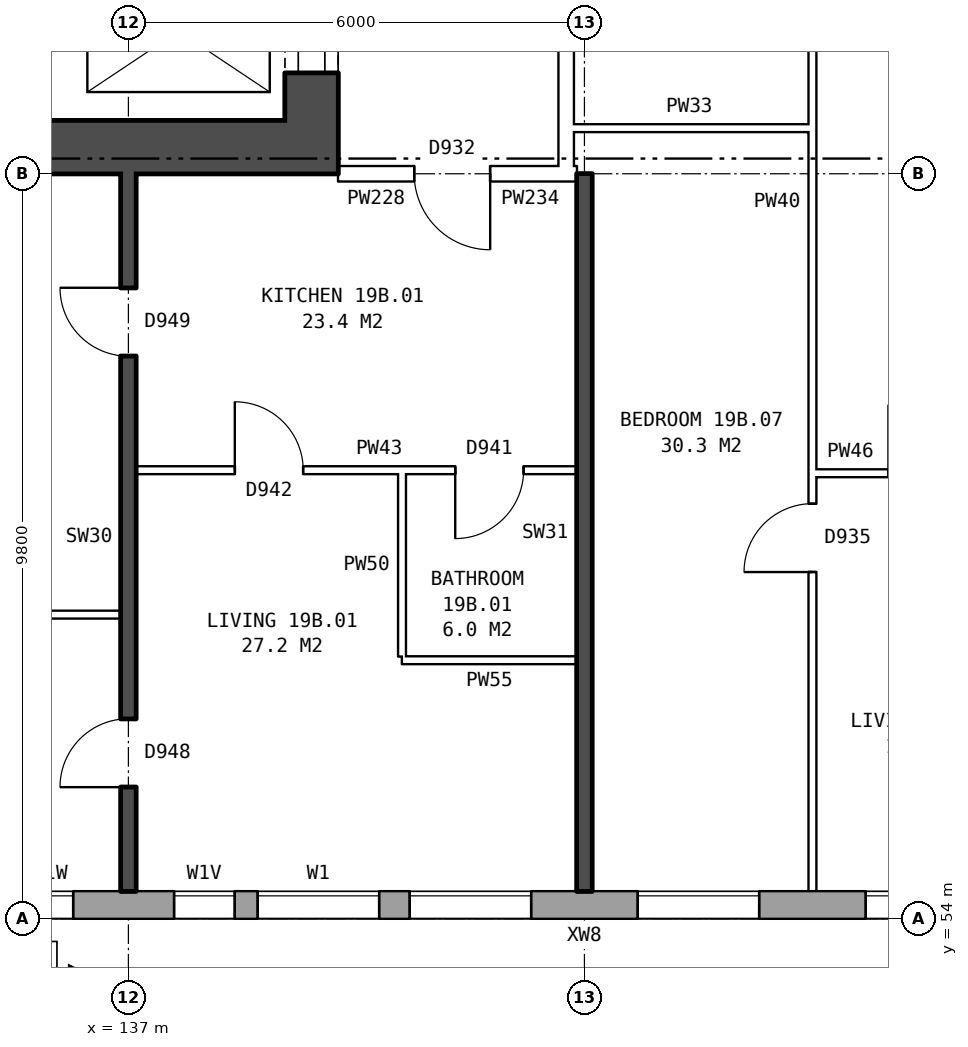
"""IFC4 building model, lengths in metres.
Left out: names, types, materials, properties, quantities, classifications, styles, units other than length and angle.
Written with IfcOpenShell. Run it as: python <this file> out.ifc"""

import sys

from ifc_helpers import new_model, si_unit, direction, frame, frame_2d, origin, place, context, subcontext, project, spatial, rectangle, extrude, element, fill, save


model = new_model("IFC4")
c1 = context("Model", 3, precision=1e-05, world=origin(), true_north=direction((0.0, 1.0)))
c2 = subcontext(c1, "Body", "Model", "MODEL_VIEW")
j1 = project(units=[si_unit("LENGTHUNIT", "METRE"), si_unit("PLANEANGLEUNIT", "RADIAN")], contexts=[c1])
p1 = place(None, origin())
s1 = spatial("IfcSite", under=j1, at=p1, CompositionType="ELEMENT")
p2 = place(p1, origin())
s2 = spatial("IfcBuilding", under=s1, at=p2, CompositionType="ELEMENT")
p3 = place(p2, frame((0.0, 0.0, 71.6)))
s3 = spatial("IfcBuildingStorey", under=s2, at=p3, CompositionType="ELEMENT", Elevation=71.6)
p4 = place(p3, frame((134.075, 54.18, 0.0), z_axis=(0.0, 0.0, 1.0), x_axis=(1.0, 0.0, 0.0)))
e1 = element("IfcWall", 1, at=p4, inside=s3, PredefinedType="STANDARD", context=c2, shape_type="SweptSolid", body=[
    extrude(rectangle(XDim=38.101, YDim=0.36, at=frame_2d((19.05, 0.0))), origin(), (0.0, 0.0, 1.0), 2.85),
])
p5 = place(p4, frame((0.3, 0.0, 0.8)))
e2 = element("IfcOpeningElement", 2, at=p5, cuts=e1, PredefinedType="OPENING", context=c2, shape_type="SweptSolid", body=[
    extrude(rectangle(XDim=1.0, YDim=1.8, at=frame_2d((0.5, 0.9))), frame((0.0, 0.19, 0.0), z_axis=(0.0, -1.0, 0.0), x_axis=(1.0, 0.0, 0.0)), (0.0, 0.0, 1.0), 0.38),
])
p6 = place(p4, frame((3.525, 0.0, 0.8)))
e3 = element("IfcOpeningElement", 3, at=p6, cuts=e1, PredefinedType="OPENING", context=c2, shape_type="SweptSolid", body=[
    extrude(rectangle(XDim=0.8, YDim=0.9, at=frame_2d((0.4, 0.45))), frame((0.0, 0.19, 0.0), z_axis=(0.0, -1.0, 0.0), x_axis=(1.0, 0.0, 0.0)), (0.0, 0.0, 1.0), 0.38),
])
p7 = place(p4, frame((6.625, 0.0, 0.8)))
e4 = element("IfcOpeningElement", 4, at=p7, cuts=e1, PredefinedType="OPENING", context=c2, shape_type="SweptSolid", body=[
    extrude(rectangle(XDim=1.6, YDim=1.8, at=frame_2d((0.8, 0.9))), frame((0.0, 0.19, 0.0), z_axis=(0.0, -1.0, 0.0), x_axis=(1.0, 0.0, 0.0)), (0.0, 0.0, 1.0), 0.38),
])
p8 = place(p4, frame((9.625, 0.0, 0.8)))
e5 = element("IfcOpeningElement", 5, at=p8, cuts=e1, PredefinedType="OPENING", context=c2, shape_type="SweptSolid", body=[
    extrude(rectangle(XDim=1.6, YDim=1.8, at=frame_2d((0.8, 0.9))), frame((0.0, 0.19, 0.0), z_axis=(0.0, -1.0, 0.0), x_axis=(1.0, 0.0, 0.0)), (0.0, 0.0, 1.0), 0.38),
])
p9 = place(p4, frame((12.625, 0.0, 0.8)))
e6 = element("IfcOpeningElement", 6, at=p9, cuts=e1, PredefinedType="OPENING", context=c2, shape_type="SweptSolid", body=[
    extrude(rectangle(XDim=1.6, YDim=1.8, at=frame_2d((0.8, 0.9))), frame((0.0, 0.19, 0.0), z_axis=(0.0, -1.0, 0.0), x_axis=(1.0, 0.0, 0.0)), (0.0, 0.0, 1.0), 0.38),
])
p10 = place(p4, frame((15.625, 0.0, 0.8)))
e7 = element("IfcOpeningElement", 7, at=p10, cuts=e1, PredefinedType="OPENING", context=c2, shape_type="SweptSolid", body=[
    extrude(rectangle(XDim=1.6, YDim=1.8, at=frame_2d((0.8, 0.9))), frame((0.0, 0.19, 0.0), z_axis=(0.0, -1.0, 0.0), x_axis=(1.0, 0.0, 0.0)), (0.0, 0.0, 1.0), 0.38),
])
p11 = place(p4, frame((18.625, 0.0, 0.8)))
e8 = element("IfcOpeningElement", 8, at=p11, cuts=e1, PredefinedType="OPENING", context=c2, shape_type="SweptSolid", body=[
    extrude(rectangle(XDim=1.6, YDim=1.8, at=frame_2d((0.8, 0.9))), frame((0.0, 0.19, 0.0), z_axis=(0.0, -1.0, 0.0), x_axis=(1.0, 0.0, 0.0)), (0.0, 0.0, 1.0), 0.38),
])
p12 = place(p4, frame((21.625, 0.0, 0.8)))
e9 = element("IfcOpeningElement", 9, at=p12, cuts=e1, PredefinedType="OPENING", context=c2, shape_type="SweptSolid", body=[
    extrude(rectangle(XDim=1.6, YDim=1.8, at=frame_2d((0.8, 0.9))), frame((0.0, 0.19, 0.0), z_axis=(0.0, -1.0, 0.0), x_axis=(1.0, 0.0, 0.0)), (0.0, 0.0, 1.0), 0.38),
])
p13 = place(p4, frame((24.625, 0.0, 0.8)))
e10 = element("IfcOpeningElement", 10, at=p13, cuts=e1, PredefinedType="OPENING", context=c2, shape_type="SweptSolid", body=[
    extrude(rectangle(XDim=1.6, YDim=1.8, at=frame_2d((0.8, 0.9))), frame((0.0, 0.19, 0.0), z_axis=(0.0, -1.0, 0.0), x_axis=(1.0, 0.0, 0.0)), (0.0, 0.0, 1.0), 0.38),
])
p14 = place(p4, frame((27.625, 0.0, 0.8)))
e11 = element("IfcOpeningElement", 11, at=p14, cuts=e1, PredefinedType="OPENING", context=c2, shape_type="SweptSolid", body=[
    extrude(rectangle(XDim=1.6, YDim=1.8, at=frame_2d((0.8, 0.9))), frame((0.0, 0.19, 0.0), z_axis=(0.0, -1.0, 0.0), x_axis=(1.0, 0.0, 0.0)), (0.0, 0.0, 1.0), 0.38),
])
p15 = place(p4, frame((30.625, 0.0, 0.8)))
e12 = element("IfcOpeningElement", 12, at=p15, cuts=e1, PredefinedType="OPENING", context=c2, shape_type="SweptSolid", body=[
    extrude(rectangle(XDim=1.6, YDim=1.8, at=frame_2d((0.8, 0.9))), frame((0.0, 0.19, 0.0), z_axis=(0.0, -1.0, 0.0), x_axis=(1.0, 0.0, 0.0)), (0.0, 0.0, 1.0), 0.38),
])
p16 = place(p4, frame((33.125, 0.0, 0.8)))
e13 = element("IfcOpeningElement", 13, at=p16, cuts=e1, PredefinedType="OPENING", context=c2, shape_type="SweptSolid", body=[
    extrude(rectangle(XDim=1.4, YDim=0.9, at=frame_2d((0.7, 0.45))), frame((0.0, 0.19, 0.0), z_axis=(0.0, -1.0, 0.0), x_axis=(1.0, 0.0, 0.0)), (0.0, 0.0, 1.0), 0.38),
])
p17 = place(p4, frame((1.6, 0.0, 1.6)))
e14 = element("IfcOpeningElement", 14, at=p17, cuts=e1, PredefinedType="OPENING", context=c2, shape_type="SweptSolid", body=[
    extrude(rectangle(XDim=0.6, YDim=0.9, at=frame_2d((0.3, 0.45))), frame((0.0, 0.19, 0.0), z_axis=(0.0, -1.0, 0.0), x_axis=(1.0, 0.0, 0.0)), (0.0, 0.0, 1.0), 0.38),
])
p18 = place(p4, frame((4.625, 0.0, 0.8)))
e15 = element("IfcOpeningElement", 15, at=p18, cuts=e1, PredefinedType="OPENING", context=c2, shape_type="SweptSolid", body=[
    extrude(rectangle(XDim=1.6, YDim=1.8, at=frame_2d((0.8, 0.9))), frame((0.0, 0.19, 0.0), z_axis=(0.0, -1.0, 0.0), x_axis=(1.0, 0.0, 0.0)), (0.0, 0.0, 1.0), 0.38),
])
p19 = place(p4, frame((35.775, 0.0, 1.7)))
e16 = element("IfcOpeningElement", 16, at=p19, cuts=e1, PredefinedType="OPENING", context=c2, shape_type="SweptSolid", body=[
    extrude(rectangle(XDim=0.6, YDim=0.9, at=frame_2d((0.3, 0.45))), frame((0.0, 0.19, 0.0), z_axis=(0.0, -1.0, 0.0), x_axis=(1.0, 0.0, 0.0)), (0.0, 0.0, 1.0), 0.38),
])
p20 = place(p4, frame((36.675, 0.0, 0.8)))
e17 = element("IfcOpeningElement", 17, at=p20, cuts=e1, PredefinedType="OPENING", context=c2, shape_type="SweptSolid", body=[
    extrude(rectangle(XDim=1.0, YDim=1.8, at=frame_2d((0.5, 0.9))), frame((0.0, 0.19, 0.0), z_axis=(0.0, -1.0, 0.0), x_axis=(1.0, 0.0, 0.0)), (0.0, 0.0, 1.0), 0.38),
])
p21 = place(p3, frame((139.41, 64.5, 0.0), z_axis=(0.0, 0.0, 1.0), x_axis=(0.0, 1.0, 0.0)))
e18 = element("IfcWall", 18, at=p21, inside=s3, PredefinedType="SHEAR", context=c2, shape_type="SweptSolid", body=[
    extrude(rectangle(XDim=11.0, YDim=0.7, at=frame_2d((5.5, 0.0))), origin(), (0.0, 0.0, 1.0), 2.85),
])
p22 = place(p21, frame((0.625, 0.0, 0.0)))
e19 = element("IfcOpeningElement", 19, at=p22, cuts=e18, PredefinedType="OPENING", context=c2, shape_type="SweptSolid", body=[
    extrude(rectangle(XDim=1.1, YDim=2.1, at=frame_2d((0.55, 1.05))), frame((0.0, 0.36, 0.0), z_axis=(0.0, -1.0, 0.0), x_axis=(1.0, 0.0, 0.0)), (0.0, 0.0, 1.0), 0.72),
])
p23 = place(p21, frame((9.2, 0.0, 0.0)))
e20 = element("IfcOpeningElement", 20, at=p23, cuts=e18, PredefinedType="OPENING", context=c2, shape_type="SweptSolid", body=[
    extrude(rectangle(XDim=1.1, YDim=2.1, at=frame_2d((0.55, 1.05))), frame((0.0, 0.36, 0.0), z_axis=(0.0, -1.0, 0.0), x_axis=(1.0, 0.0, 0.0)), (0.0, 0.0, 1.0), 0.72),
])
p24 = place(p21, frame((7.425, 0.0, 0.0)))
e21 = element("IfcOpeningElement", 21, at=p24, cuts=e18, PredefinedType="OPENING", context=c2, shape_type="SweptSolid", body=[
    extrude(rectangle(XDim=0.85, YDim=2.1, at=frame_2d((0.425, 1.05))), frame((0.0, 0.36, 0.0), z_axis=(0.0, -1.0, 0.0), x_axis=(1.0, 0.0, 0.0)), (0.0, 0.0, 1.0), 0.72),
])
p25 = place(p3, frame((139.76, 64.15, 0.0), z_axis=(0.0, 0.0, 1.0), x_axis=(-1.0, 0.0, 0.0)))
e22 = element("IfcWall", 22, at=p25, inside=s3, PredefinedType="SHEAR", context=c2, shape_type="SweptSolid", body=[
    extrude(rectangle(XDim=8.4, YDim=0.7, at=frame_2d((4.2, 0.0))), origin(), (0.0, 0.0, 1.0), 2.85),
])
p26 = place(p3, frame((142.76, 63.9, 0.0), z_axis=(0.0, 0.0, 1.0), x_axis=(0.0, 1.0, 0.0)))
e23 = element("IfcWall", 23, at=p26, inside=s3, PredefinedType="PARTITIONING", context=c2, shape_type="SweptSolid", body=[
    extrude(rectangle(XDim=12.2, YDim=0.2, at=frame_2d((6.1, 0.0))), origin(), (0.0, 0.0, 1.0), 2.85),
])
p27 = place(p26, frame((5.1, 0.0, 0.0)))
e24 = element("IfcOpeningElement", 24, at=p27, cuts=e23, PredefinedType="OPENING", context=c2, shape_type="SweptSolid", body=[
    extrude(rectangle(XDim=2.0, YDim=2.1, at=frame_2d((1.0, 1.05))), frame((0.0, 0.11, 0.0), z_axis=(0.0, -1.0, 0.0), x_axis=(1.0, 0.0, 0.0)), (0.0, 0.0, 1.0), 0.22),
])
p28 = place(p3, frame((140.6, 57.4, 0.0), z_axis=(0.0, 0.0, 1.0), x_axis=(1.0, 0.0, 0.0)))
e25 = element("IfcWall", 25, at=p28, inside=s3, PredefinedType="PARTITIONING", context=c2, shape_type="SweptSolid", body=[
    extrude(rectangle(XDim=2.3, YDim=0.1, at=frame_2d((1.15, 0.0))), origin(), (0.0, 0.0, 1.0), 2.85),
])
p29 = place(p3, frame((131.36, 58.0, 0.0), z_axis=(0.0, 0.0, 1.0), x_axis=(1.0, 0.0, 0.0)))
e26 = element("IfcWall", 26, at=p29, inside=s3, PredefinedType="PARTITIONING", context=c2, shape_type="SweptSolid", body=[
    extrude(rectangle(XDim=5.54, YDim=0.1, at=frame_2d((2.77, 0.0))), origin(), (0.0, 0.0, 1.0), 2.85),
])
p30 = place(p3, frame((146.0, 59.86, 0.0), z_axis=(0.0, 0.0, 1.0), x_axis=(1.0, 0.0, 0.0)))
e27 = element("IfcWall", 27, at=p30, inside=s3, PredefinedType="PARTITIONING", context=c2, shape_type="SweptSolid", body=[
    extrude(rectangle(XDim=2.9, YDim=0.1, at=frame_2d((1.45, 0.0))), origin(), (0.0, 0.0, 1.0), 2.85),
])
p31 = place(p30, frame((1.0, 0.0, 0.0)))
e28 = element("IfcOpeningElement", 28, at=p31, cuts=e27, PredefinedType="OPENING", context=c2, shape_type="SweptSolid", body=[
    extrude(rectangle(XDim=0.9, YDim=2.1, at=frame_2d((0.45, 1.05))), frame((0.0, 0.06, 0.0), z_axis=(0.0, -1.0, 0.0), x_axis=(1.0, 0.0, 0.0)), (0.0, 0.0, 1.0), 0.12),
])
p32 = place(p3, frame((137.1, 59.9, 0.0), z_axis=(0.0, 0.0, 1.0), x_axis=(1.0, 0.0, 0.0)))
e29 = element("IfcWall", 29, at=p32, inside=s3, PredefinedType="PARTITIONING", context=c2, shape_type="SweptSolid", body=[
    extrude(rectangle(XDim=5.8, YDim=0.1, at=frame_2d((2.9, 0.0))), origin(), (0.0, 0.0, 1.0), 2.85),
])
p33 = place(p32, frame((1.3, 0.0, 0.0)))
e30 = element("IfcOpeningElement", 30, at=p33, cuts=e29, PredefinedType="OPENING", context=c2, shape_type="SweptSolid", body=[
    extrude(rectangle(XDim=0.9, YDim=2.1, at=frame_2d((0.45, 1.05))), frame((0.0, 0.06, 0.0), z_axis=(0.0, -1.0, 0.0), x_axis=(1.0, 0.0, 0.0)), (0.0, 0.0, 1.0), 0.12),
])
p34 = place(p32, frame((4.2, 0.0, 0.0)))
e31 = element("IfcOpeningElement", 31, at=p34, cuts=e29, PredefinedType="OPENING", context=c2, shape_type="SweptSolid", body=[
    extrude(rectangle(XDim=0.9, YDim=2.1, at=frame_2d((0.45, 1.05))), frame((0.0, 0.06, 0.0), z_axis=(0.0, -1.0, 0.0), x_axis=(1.0, 0.0, 0.0)), (0.0, 0.0, 1.0), 0.12),
])
p35 = place(p3, frame((139.76, 63.8, 0.0), z_axis=(0.0, 0.0, 1.0), x_axis=(1.0, 0.0, 0.0)))
e32 = element("IfcWall", 32, at=p35, inside=s3, PredefinedType="PARTITIONING", context=c2, shape_type="SweptSolid", body=[
    extrude(rectangle(XDim=3.0, YDim=0.2, at=frame_2d((1.5, 0.0))), origin(), (0.0, 0.0, 1.0), 2.85),
])
p36 = place(p35, frame((1.0, 0.0, 0.0)))
e33 = element("IfcOpeningElement", 33, at=p36, cuts=e32, PredefinedType="OPENING", context=c2, shape_type="SweptSolid", body=[
    extrude(rectangle(XDim=1.0, YDim=2.1, at=frame_2d((0.5, 1.05))), frame((0.0, 0.11, 0.0), z_axis=(0.0, -1.0, 0.0), x_axis=(1.0, 0.0, 0.0)), (0.0, 0.0, 1.0), 0.22),
])
p37 = place(p3, frame((142.76, 63.8, 0.0), z_axis=(0.0, 0.0, 1.0), x_axis=(1.0, 0.0, 0.0)))
e34 = element("IfcWall", 34, at=p37, inside=s3, PredefinedType="PARTITIONING", context=c2, shape_type="SweptSolid", body=[
    extrude(rectangle(XDim=0.14, YDim=0.2, at=frame_2d((0.07, 0.0))), origin(), (0.0, 0.0, 1.0), 2.85),
])
p38 = place(p3, frame((142.76, 64.4, 0.0), z_axis=(0.0, 0.0, 1.0), x_axis=(1.0, 0.0, 0.0)))
e35 = element("IfcWall", 35, at=p38, inside=s3, PredefinedType="PARTITIONING", context=c2, shape_type="SweptSolid", body=[
    extrude(rectangle(XDim=3.24, YDim=0.1, at=frame_2d((1.62, 0.0))), origin(), (0.0, 0.0, 1.0), 2.85),
])
p39 = place(p3, frame((137.0, 54.36, 0.0), z_axis=(0.0, 0.0, 1.0), x_axis=(0.0, 1.0, 0.0)))
e36 = element("IfcWall", 36, at=p39, inside=s3, PredefinedType="SOLIDWALL", context=c2, shape_type="SweptSolid", body=[
    extrude(rectangle(XDim=9.44, YDim=0.2, at=frame_2d((4.72, 0.0))), origin(), (0.0, 0.0, 1.0), 2.85),
])
p40 = place(p39, frame((1.37, 0.0, 0.0)))
e37 = element("IfcOpeningElement", 37, at=p40, cuts=e36, PredefinedType="OPENING", context=c2, shape_type="SweptSolid", body=[
    extrude(rectangle(XDim=0.9, YDim=2.1, at=frame_2d((0.45, 1.05))), frame((0.0, 0.11, 0.0), z_axis=(0.0, -1.0, 0.0), x_axis=(1.0, 0.0, 0.0)), (0.0, 0.0, 1.0), 0.22),
])
p41 = place(p39, frame((7.04, 0.0, 0.0)))
e38 = element("IfcOpeningElement", 38, at=p41, cuts=e36, PredefinedType="OPENING", context=c2, shape_type="SweptSolid", body=[
    extrude(rectangle(XDim=0.9, YDim=2.1, at=frame_2d((0.45, 1.05))), frame((0.0, 0.11, 0.0), z_axis=(0.0, -1.0, 0.0), x_axis=(1.0, 0.0, 0.0)), (0.0, 0.0, 1.0), 0.22),
])
p42 = place(p3, frame((140.6, 57.45, 0.0), z_axis=(0.0, 0.0, 1.0), x_axis=(0.0, 1.0, 0.0)))
e39 = element("IfcWall", 39, at=p42, inside=s3, PredefinedType="PARTITIONING", context=c2, shape_type="SweptSolid", body=[
    extrude(rectangle(XDim=2.4, YDim=0.1, at=frame_2d((1.2, 0.0))), origin(), (0.0, 0.0, 1.0), 2.85),
])
p43 = place(p3, frame((143.0, 54.36, 0.0), z_axis=(0.0, 0.0, 1.0), x_axis=(0.0, 1.0, 0.0)))
e40 = element("IfcWall", 40, at=p43, inside=s3, PredefinedType="SOLIDWALL", context=c2, shape_type="SweptSolid", body=[
    extrude(rectangle(XDim=9.44, YDim=0.2, at=frame_2d((4.72, 0.0))), origin(), (0.0, 0.0, 1.0), 2.85),
])
p44 = place(p3, frame((146.0, 54.36, 0.0), z_axis=(0.0, 0.0, 1.0), x_axis=(0.0, 1.0, 0.0)))
e41 = element("IfcWall", 41, at=p44, inside=s3, PredefinedType="PARTITIONING", context=c2, shape_type="SweptSolid", body=[
    extrude(rectangle(XDim=14.34, YDim=0.1, at=frame_2d((7.17, 0.0))), origin(), (0.0, 0.0, 1.0), 2.85),
])
p45 = place(p44, frame((4.2, 0.0, 0.0)))
e42 = element("IfcOpeningElement", 42, at=p45, cuts=e41, PredefinedType="OPENING", context=c2, shape_type="SweptSolid", body=[
    extrude(rectangle(XDim=0.9, YDim=2.1, at=frame_2d((0.45, 1.05))), frame((0.0, 0.06, 0.0), z_axis=(0.0, -1.0, 0.0), x_axis=(1.0, 0.0, 0.0)), (0.0, 0.0, 1.0), 0.12),
])
p46 = place(p44, frame((13.04, 0.0, 0.0)))
e43 = element("IfcOpeningElement", 43, at=p46, cuts=e41, PredefinedType="OPENING", context=c2, shape_type="SweptSolid", body=[
    extrude(rectangle(XDim=0.9, YDim=2.1, at=frame_2d((0.45, 1.05))), frame((0.0, 0.06, 0.0), z_axis=(0.0, -1.0, 0.0), x_axis=(1.0, 0.0, 0.0)), (0.0, 0.0, 1.0), 0.12),
])
p47 = place(p6, origin())
e44 = element("IfcWindow", 44, at=p47, inside=s3, PartitioningType="SINGLE_PANEL", PredefinedType="WINDOW", context=c2, shape_type="SweptSolid", body=[
    extrude(rectangle(XDim=0.8, YDim=0.9, at=frame_2d((0.4, 0.45))), frame((0.0, 0.15, 0.0), z_axis=(0.0, -1.0, 0.0), x_axis=(1.0, 0.0, 0.0)), (0.0, 0.0, 1.0), 0.06),
])
fill(e3, e44)
p48 = place(p7, origin())
e45 = element("IfcWindow", 45, at=p48, inside=s3, PartitioningType="SINGLE_PANEL", PredefinedType="WINDOW", context=c2, shape_type="SweptSolid", body=[
    extrude(rectangle(XDim=1.6, YDim=1.8, at=frame_2d((0.8, 0.9))), frame((0.0, 0.15, 0.0), z_axis=(0.0, -1.0, 0.0), x_axis=(1.0, 0.0, 0.0)), (0.0, 0.0, 1.0), 0.06),
])
fill(e4, e45)
p49 = place(p8, origin())
e46 = element("IfcWindow", 46, at=p49, inside=s3, PartitioningType="SINGLE_PANEL", PredefinedType="WINDOW", context=c2, shape_type="SweptSolid", body=[
    extrude(rectangle(XDim=1.6, YDim=1.8, at=frame_2d((0.8, 0.9))), frame((0.0, 0.15, 0.0), z_axis=(0.0, -1.0, 0.0), x_axis=(1.0, 0.0, 0.0)), (0.0, 0.0, 1.0), 0.06),
])
fill(e5, e46)
p50 = place(p9, origin())
e47 = element("IfcWindow", 47, at=p50, inside=s3, PartitioningType="SINGLE_PANEL", PredefinedType="WINDOW", context=c2, shape_type="SweptSolid", body=[
    extrude(rectangle(XDim=1.6, YDim=1.8, at=frame_2d((0.8, 0.9))), frame((0.0, 0.15, 0.0), z_axis=(0.0, -1.0, 0.0), x_axis=(1.0, 0.0, 0.0)), (0.0, 0.0, 1.0), 0.06),
])
fill(e6, e47)
p51 = place(p22, origin())
e48 = element("IfcDoor", 48, at=p51, inside=s3, OperationType="DOUBLE_DOOR_SLIDING", PredefinedType="DOOR", context=c2, shape_type="SweptSolid", body=[
    extrude(rectangle(XDim=1.1, YDim=2.1, at=frame_2d((0.55, 1.05))), frame((0.0, 0.335, 0.0), z_axis=(0.0, -1.0, 0.0), x_axis=(1.0, 0.0, 0.0)), (0.0, 0.0, 1.0), 0.05),
])
fill(e19, e48)
p52 = place(p40, origin())
e49 = element("IfcDoor", 49, at=p52, inside=s3, OperationType="SINGLE_SWING_LEFT", PredefinedType="DOOR", context=c2, shape_type="SweptSolid", body=[
    extrude(rectangle(XDim=0.9, YDim=2.1, at=frame_2d((0.45, 1.05))), frame((0.0, 0.025, 0.0), z_axis=(0.0, -1.0, 0.0), x_axis=(1.0, 0.0, 0.0)), (0.0, 0.0, 1.0), 0.05),
])
fill(e37, e49)
p53 = place(p41, origin())
e50 = element("IfcDoor", 50, at=p53, inside=s3, OperationType="SINGLE_SWING_RIGHT", PredefinedType="DOOR", context=c2, shape_type="SweptSolid", body=[
    extrude(rectangle(XDim=0.9, YDim=2.1, at=frame_2d((0.45, 1.05))), frame((0.0, 0.025, 0.0), z_axis=(0.0, -1.0, 0.0), x_axis=(1.0, 0.0, 0.0)), (0.0, 0.0, 1.0), 0.05),
])
fill(e38, e50)
p54 = place(p36, frame((1.0, 0.0, 0.0), z_axis=(0.0, 0.0, 1.0), x_axis=(-1.0, 0.0, 0.0)))
e51 = element("IfcDoor", 51, at=p54, inside=s3, OperationType="SINGLE_SWING_LEFT", PredefinedType="DOOR", context=c2, shape_type="SweptSolid", body=[
    extrude(rectangle(XDim=1.0, YDim=2.1, at=frame_2d((0.5, 1.05))), frame((0.0, 0.025, 0.0), z_axis=(0.0, -1.0, 0.0), x_axis=(1.0, 0.0, 0.0)), (0.0, 0.0, 1.0), 0.05),
])
fill(e33, e51)
p55 = place(p33, origin())
e52 = element("IfcDoor", 52, at=p55, inside=s3, OperationType="SINGLE_SWING_LEFT", PredefinedType="DOOR", context=c2, shape_type="SweptSolid", body=[
    extrude(rectangle(XDim=0.9, YDim=2.1, at=frame_2d((0.45, 1.05))), frame((0.0, 0.025, 0.0), z_axis=(0.0, -1.0, 0.0), x_axis=(1.0, 0.0, 0.0)), (0.0, 0.0, 1.0), 0.05),
])
fill(e30, e52)
p56 = place(p34, frame((0.9, 0.0, 0.0), z_axis=(0.0, 0.0, 1.0), x_axis=(-1.0, 0.0, 0.0)))
e53 = element("IfcDoor", 53, at=p56, inside=s3, OperationType="SINGLE_SWING_RIGHT", PredefinedType="DOOR", context=c2, shape_type="SweptSolid", body=[
    extrude(rectangle(XDim=0.9, YDim=2.1, at=frame_2d((0.45, 1.05))), frame((0.0, 0.025, 0.0), z_axis=(0.0, -1.0, 0.0), x_axis=(1.0, 0.0, 0.0)), (0.0, 0.0, 1.0), 0.05),
])
fill(e31, e53)
p57 = place(p45, origin())
e54 = element("IfcDoor", 54, at=p57, inside=s3, OperationType="SINGLE_SWING_LEFT", PredefinedType="DOOR", context=c2, shape_type="SweptSolid", body=[
    extrude(rectangle(XDim=0.9, YDim=2.1, at=frame_2d((0.45, 1.05))), frame((0.0, 0.025, 0.0), z_axis=(0.0, -1.0, 0.0), x_axis=(1.0, 0.0, 0.0)), (0.0, 0.0, 1.0), 0.05),
])
fill(e42, e54)
p58 = place(p17, origin())
e55 = element("IfcWindow", 55, at=p58, inside=s3, PartitioningType="SINGLE_PANEL", PredefinedType="WINDOW", context=c2, shape_type="SweptSolid", body=[
    extrude(rectangle(XDim=0.6, YDim=0.9, at=frame_2d((0.3, 0.45))), frame((0.0, 0.15, 0.0), z_axis=(0.0, -1.0, 0.0), x_axis=(1.0, 0.0, 0.0)), (0.0, 0.0, 1.0), 0.06),
])
fill(e14, e55)
p59 = place(p18, origin())
e56 = element("IfcWindow", 56, at=p59, inside=s3, PartitioningType="SINGLE_PANEL", PredefinedType="WINDOW", context=c2, shape_type="SweptSolid", body=[
    extrude(rectangle(XDim=1.6, YDim=1.8, at=frame_2d((0.8, 0.9))), frame((0.0, 0.15, 0.0), z_axis=(0.0, -1.0, 0.0), x_axis=(1.0, 0.0, 0.0)), (0.0, 0.0, 1.0), 0.06),
])
fill(e15, e56)
save(model, sys.argv[1])
